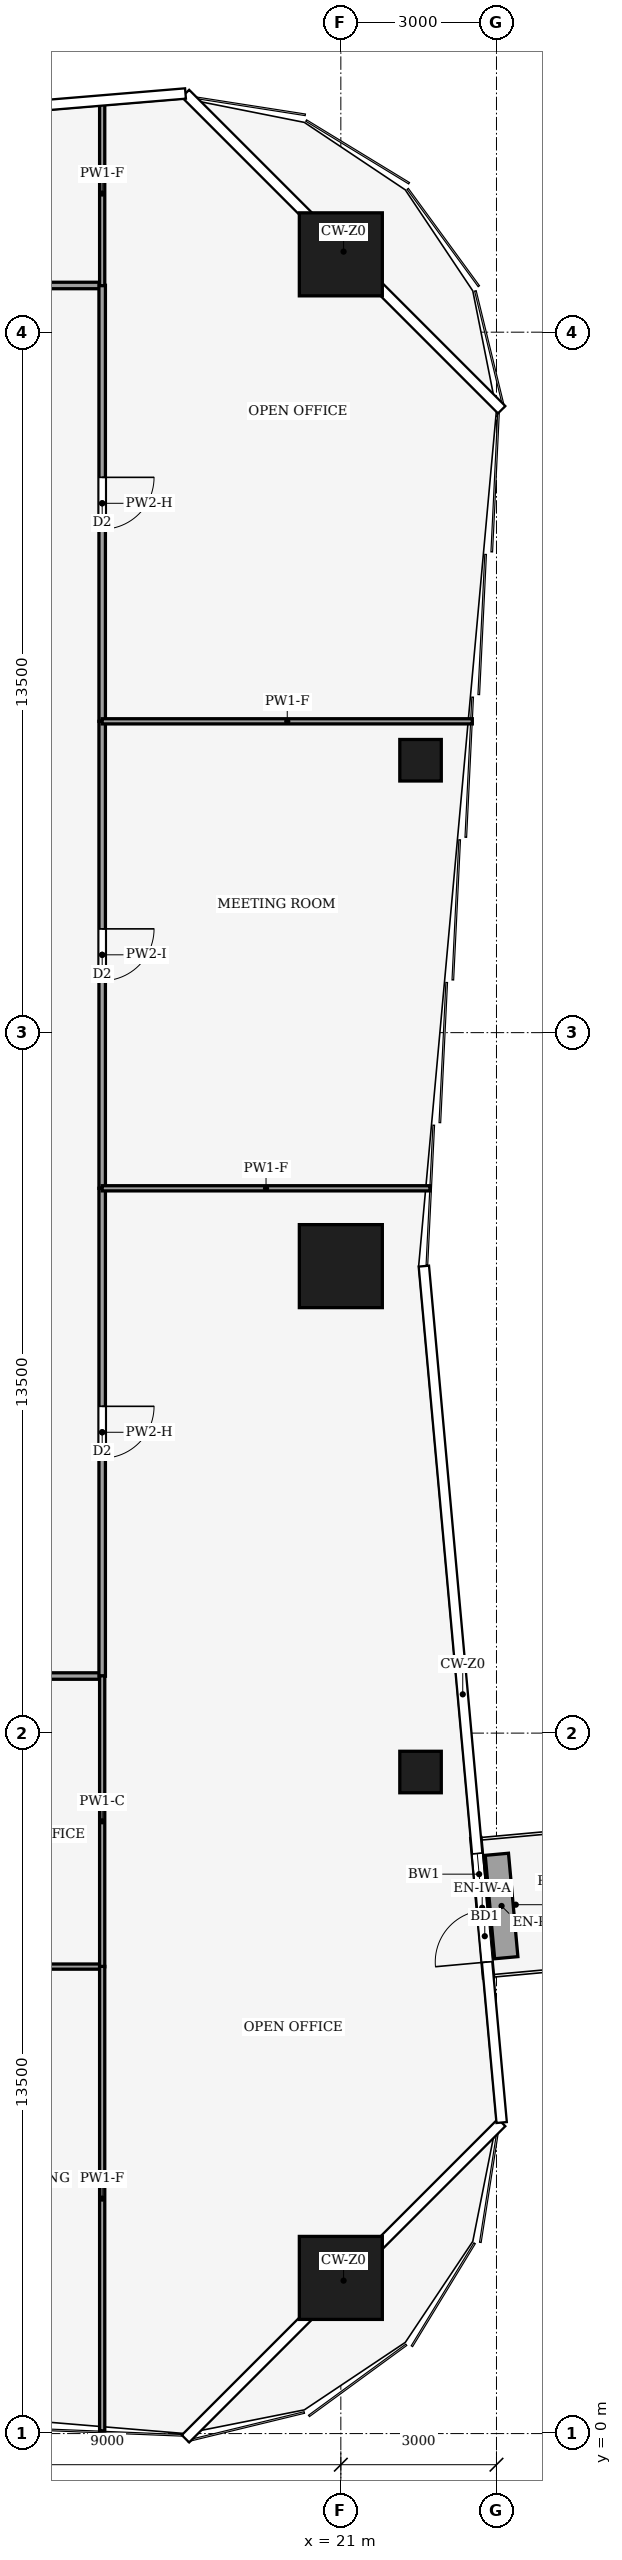
"""IFC4 building model, lengths in metres.
Left out: names, types, materials, properties, quantities, classifications, styles, units other than length and angle.
Written with IfcOpenShell. Run it as: python <this file> out.ifc"""

import sys

from ifc_helpers import new_model, si_unit, direction, frame, frame_2d, origin, origin_2d, place, context, subcontext, project, spatial, rectangle, hollow_rectangle, extrude, element, fill, save


model = new_model("IFC4")
c1 = context("Model", 3, precision=1e-05, world=origin(), true_north=direction((0.0, 1.0)))
c2 = subcontext(c1, "Body", "Model", "MODEL_VIEW")
j1 = project(units=[si_unit("LENGTHUNIT", "METRE"), si_unit("PLANEANGLEUNIT", "RADIAN")], contexts=[c1])
p1 = place(None, origin())
s1 = spatial("IfcSite", under=j1, at=p1, CompositionType="ELEMENT")
p2 = place(p1, origin())
s2 = spatial("IfcBuilding", under=s1, at=p2, CompositionType="ELEMENT")
p3 = place(p2, frame((0.0, 0.0, 42.0)))
s3 = spatial("IfcBuildingStorey", under=s2, at=p3, CompositionType="ELEMENT", Elevation=42.0)
for number, where, z_axis, x_axis in (
    (1, (21.0, 42.0, 0.0), (0.0, 0.0, 1.0), (1.0, 0.0, 0.0)),
    (2, (21.0, 22.5, 0.0), (0.0, 0.0, 1.0), (1.0, 0.0, 0.0)),
    (3, (21.0, 3.0, 0.0), (0.0, 0.0, 1.0), (1.0, 0.0, 0.0)),
):
    element("IfcColumn", number, at=place(p3, frame(where, z_axis=z_axis, x_axis=x_axis)), inside=s3, PredefinedType="COLUMN", context=c2, shape_type="SweptSolid", body=[
        extrude(hollow_rectangle(XDim=1.6, YDim=1.6, WallThickness=0.09, at=origin_2d()), origin(), (0.0, 0.0, 1.0), 4.0),
    ])
for number, where, z_axis, x_axis in (
    (4, (22.536, 12.75, 0.0), (0.0, 0.0, 1.0), (1.0, 0.0, 0.0)),
    (5, (22.536, 32.25, 0.0), (0.0, 0.0, 1.0), (1.0, 0.0, 0.0)),
):
    element("IfcColumn", number, at=place(p3, frame(where, z_axis=z_axis, x_axis=x_axis)), inside=s3, PredefinedType="COLUMN", context=c2, shape_type="SweptSolid", body=[
        extrude(hollow_rectangle(XDim=0.8, YDim=0.8, WallThickness=0.04, at=origin_2d()), origin(), (0.0, 0.0, 1.0), 4.0),
    ])
p4 = place(p3, frame((23.847, 8.789, 0.0), z_axis=(0.0, 0.0, 1.0), x_axis=(-0.090552042494, 0.995891724838, 0.0)))
e6 = element("IfcWall", 6, at=p4, inside=s3, PredefinedType="SOLIDWALL", context=c2, shape_type="SweptSolid", body=[
    extrude(rectangle(XDim=2.701, YDim=0.2, at=frame_2d((1.351, 0.0))), origin(), (0.0, 0.0, 1.0), 3.65),
])
p5 = place(p4, frame((0.3, 0.0, 0.0)))
e7 = element("IfcOpeningElement", 7, at=p5, cuts=e6, PredefinedType="OPENING", context=c2, shape_type="SweptSolid", body=[
    extrude(rectangle(XDim=1.0, YDim=2.1, at=frame_2d((0.5, 1.05))), frame((0.0, 0.11, 0.0), z_axis=(0.0, -1.0, 0.0), x_axis=(1.0, 0.0, 0.0)), (0.0, 0.0, 1.0), 0.22),
])
p6 = place(p4, frame((1.601, 0.0, 0.9)))
e8 = element("IfcOpeningElement", 8, at=p6, cuts=e6, PredefinedType="OPENING", context=c2, shape_type="SweptSolid", body=[
    extrude(rectangle(XDim=0.8, YDim=1.2, at=frame_2d((0.4, 0.6))), frame((0.0, 0.11, 0.0), z_axis=(0.0, -1.0, 0.0), x_axis=(1.0, 0.0, 0.0)), (0.0, 0.0, 1.0), 0.22),
])
p7 = place(p3, frame((24.189, 9.171, 0.0), z_axis=(0.0, 0.0, 1.0), x_axis=(-0.090513748512, 0.995895205998, 0.0)))
e9 = element("IfcWall", 9, at=p7, inside=s3, PredefinedType="USERDEFINED", context=c2, shape_type="SweptSolid", body=[
    extrude(rectangle(XDim=2.001, YDim=0.45, at=frame_2d((1.001, 0.0))), origin(), (0.0, 0.0, 1.0), 0.4),
])
p8 = place(p3, frame((16.4, 14.6, 0.0), z_axis=(0.0, 0.0, 1.0), x_axis=(-1.0, 0.0, 0.0)))
e10 = element("IfcWall", 10, at=p8, inside=s3, PredefinedType="PARTITIONING", context=c2, shape_type="SweptSolid", body=[
    extrude(rectangle(XDim=4.4, YDim=0.125, at=frame_2d((2.2, 0.0))), origin(), (0.0, 0.0, 1.0), 3.29),
])
p9 = place(p8, frame((1.7, 0.0, 0.0)))
e11 = element("IfcOpeningElement", 11, at=p9, cuts=e10, PredefinedType="OPENING", context=c2, shape_type="SweptSolid", body=[
    extrude(rectangle(XDim=1.0, YDim=2.1, at=frame_2d((0.5, 1.05))), frame((0.0, 0.073, 0.0), z_axis=(0.0, -1.0, 0.0), x_axis=(1.0, 0.0, 0.0)), (0.0, 0.0, 1.0), 0.145),
])
p10 = place(p3, frame((6.0, 41.4, 0.0), z_axis=(0.0, 0.0, 1.0), x_axis=(1.0, 0.0, 0.0)))
e12 = element("IfcWall", 12, at=p10, inside=s3, PredefinedType="PARTITIONING", context=c2, shape_type="SweptSolid", body=[
    extrude(rectangle(XDim=10.4, YDim=0.125, at=frame_2d((5.2, 0.0))), origin(), (0.0, 0.0, 1.0), 3.54),
])
p11 = place(p10, frame((1.9, 0.0, 0.0)))
e13 = element("IfcOpeningElement", 13, at=p11, cuts=e12, PredefinedType="OPENING", context=c2, shape_type="SweptSolid", body=[
    extrude(rectangle(XDim=1.0, YDim=2.1, at=frame_2d((0.5, 1.05))), frame((0.0, 0.073, 0.0), z_axis=(0.0, -1.0, 0.0), x_axis=(1.0, 0.0, 0.0)), (0.0, 0.0, 1.0), 0.145),
])
p12 = place(p3, frame((16.4, 24.0, 0.0), z_axis=(0.0, 0.0, 1.0), x_axis=(0.0, -1.0, 0.0)))
e14 = element("IfcWall", 14, at=p12, inside=s3, PredefinedType="PARTITIONING", context=c2, shape_type="SweptSolid", body=[
    extrude(rectangle(XDim=9.404, YDim=0.125, at=frame_2d((4.702, 0.0))), origin(), (0.0, 0.0, 1.0), 3.14),
])
p13 = place(p12, frame((4.202, 0.0, 0.0)))
e15 = element("IfcOpeningElement", 15, at=p13, cuts=e14, PredefinedType="OPENING", context=c2, shape_type="SweptSolid", body=[
    extrude(rectangle(XDim=1.0, YDim=2.1, at=frame_2d((0.5, 1.05))), frame((0.0, 0.073, 0.0), z_axis=(0.0, -1.0, 0.0), x_axis=(1.0, 0.0, 0.0)), (0.0, 0.0, 1.0), 0.145),
])
p14 = place(p3, frame((16.4, 33.0, 0.0), z_axis=(0.0, 0.0, 1.0), x_axis=(0.0, -1.0, 0.0)))
e16 = element("IfcWall", 16, at=p14, inside=s3, PredefinedType="PARTITIONING", context=c2, shape_type="SweptSolid", body=[
    extrude(rectangle(XDim=9.0, YDim=0.125, at=frame_2d((4.5, 0.0))), origin(), (0.0, 0.0, 1.0), 3.48),
])
p15 = place(p14, frame((4.0, 0.0, 0.0)))
e17 = element("IfcOpeningElement", 17, at=p15, cuts=e16, PredefinedType="OPENING", context=c2, shape_type="SweptSolid", body=[
    extrude(rectangle(XDim=1.0, YDim=2.1, at=frame_2d((0.5, 1.05))), frame((0.0, 0.073, 0.0), z_axis=(0.0, -1.0, 0.0), x_axis=(1.0, 0.0, 0.0)), (0.0, 0.0, 1.0), 0.145),
])
p16 = place(p3, frame((16.4, 41.404, 0.0), z_axis=(0.0, 0.0, 1.0), x_axis=(0.0, -1.0, 0.0)))
e18 = element("IfcWall", 18, at=p16, inside=s3, PredefinedType="PARTITIONING", context=c2, shape_type="SweptSolid", body=[
    extrude(rectangle(XDim=8.404, YDim=0.125, at=frame_2d((4.202, 0.0))), origin(), (0.0, 0.0, 1.0), 3.14),
])
p17 = place(p16, frame((3.702, 0.0, 0.0)))
e19 = element("IfcOpeningElement", 19, at=p17, cuts=e18, PredefinedType="OPENING", context=c2, shape_type="SweptSolid", body=[
    extrude(rectangle(XDim=1.0, YDim=2.1, at=frame_2d((0.5, 1.05))), frame((0.0, 0.073, 0.0), z_axis=(0.0, -1.0, 0.0), x_axis=(1.0, 0.0, 0.0)), (0.0, 0.0, 1.0), 0.145),
])
p18 = place(p3, frame((16.4, 9.0, 0.0), z_axis=(0.0, 0.0, 1.0), x_axis=(-1.0, 0.0, 0.0)))
e20 = element("IfcWall", 20, at=p18, inside=s3, PredefinedType="PARTITIONING", context=c2, shape_type="SweptSolid", body=[
    extrude(rectangle(XDim=4.4, YDim=0.1, at=frame_2d((2.2, 0.0))), origin(), (0.0, 0.0, 1.0), 3.29),
])
p19 = place(p18, frame((1.7, 0.0, 0.0)))
e21 = element("IfcOpeningElement", 21, at=p19, cuts=e20, PredefinedType="OPENING", context=c2, shape_type="SweptSolid", body=[
    extrude(rectangle(XDim=1.0, YDim=2.1, at=frame_2d((0.5, 1.05))), frame((0.0, 0.06, 0.0), z_axis=(0.0, -1.0, 0.0), x_axis=(1.0, 0.0, 0.0)), (0.0, 0.0, 1.0), 0.12),
])
p20 = place(p3, frame((16.4, 8.996, 0.0), z_axis=(0.0, 0.0, 1.0), x_axis=(0.0, 1.0, 0.0)))
e22 = element("IfcWall", 22, at=p20, inside=s3, PredefinedType="PARTITIONING", context=c2, shape_type="SweptSolid", body=[
    extrude(rectangle(XDim=5.608, YDim=0.1, at=frame_2d((2.804, 0.0))), origin(), (0.0, 0.0, 1.0), 3.87),
])
p21 = place(p3, frame((16.4, 0.053, 0.0), z_axis=(0.0, 0.0, 1.0), x_axis=(0.0, 1.0, 0.0)))
e23 = element("IfcWall", 23, at=p21, inside=s3, PredefinedType="PARTITIONING", context=c2, shape_type="SweptSolid", body=[
    extrude(rectangle(XDim=8.951, YDim=0.1, at=frame_2d((4.475, 0.0))), origin(), (0.0, 0.0, 1.0), 3.04),
])
p22 = place(p3, frame((16.4, 41.396, 0.0), z_axis=(0.0, 0.0, 1.0), x_axis=(0.0, 1.0, 0.0)))
e24 = element("IfcWall", 24, at=p22, inside=s3, PredefinedType="PARTITIONING", context=c2, shape_type="SweptSolid", body=[
    extrude(rectangle(XDim=3.551, YDim=0.1, at=frame_2d((1.775, 0.0))), origin(), (0.0, 0.0, 1.0), 3.04),
])
p23 = place(p3, frame((22.716, 24.0, 0.0), z_axis=(0.0, 0.0, 1.0), x_axis=(-1.0, 0.0, 0.0)))
e25 = element("IfcWall", 25, at=p23, inside=s3, PredefinedType="PARTITIONING", context=c2, shape_type="SweptSolid", body=[
    extrude(rectangle(XDim=6.316, YDim=0.1, at=frame_2d((3.158, 0.0))), origin(), (0.0, 0.0, 1.0), 3.04),
])
p24 = place(p3, frame((23.534, 33.0, 0.0), z_axis=(0.0, 0.0, 1.0), x_axis=(-1.0, 0.0, 0.0)))
e26 = element("IfcWall", 26, at=p24, inside=s3, PredefinedType="PARTITIONING", context=c2, shape_type="SweptSolid", body=[
    extrude(rectangle(XDim=7.135, YDim=0.1, at=frame_2d((3.567, 0.0))), origin(), (0.0, 0.0, 1.0), 3.04),
])
p25 = place(p5, origin())
e27 = element("IfcDoor", 27, at=p25, inside=s3, OperationType="SINGLE_SWING_LEFT", PredefinedType="DOOR", context=c2, shape_type="SweptSolid", body=[
    extrude(rectangle(XDim=1.0, YDim=2.1, at=frame_2d((0.5, 1.05))), frame((0.0, 0.025, 0.0), z_axis=(0.0, -1.0, 0.0), x_axis=(1.0, 0.0, 0.0)), (0.0, 0.0, 1.0), 0.05),
])
fill(e7, e27)
p26 = place(p6, origin())
e28 = element("IfcWindow", 28, at=p26, inside=s3, PartitioningType="SINGLE_PANEL", PredefinedType="WINDOW", context=c2, shape_type="SweptSolid", body=[
    extrude(rectangle(XDim=0.8, YDim=1.2, at=frame_2d((0.4, 0.6))), frame((0.0, 0.03, 0.0), z_axis=(0.0, -1.0, 0.0), x_axis=(1.0, 0.0, 0.0)), (0.0, 0.0, 1.0), 0.06),
])
fill(e8, e28)
p27 = place(p13, origin())
e29 = element("IfcDoor", 29, at=p27, inside=s3, OperationType="SINGLE_SWING_RIGHT", PredefinedType="DOOR", context=c2, shape_type="SweptSolid", body=[
    extrude(rectangle(XDim=1.0, YDim=2.1, at=frame_2d((0.5, 1.05))), frame((0.0, 0.025, 0.0), z_axis=(0.0, -1.0, 0.0), x_axis=(1.0, 0.0, 0.0)), (0.0, 0.0, 1.0), 0.05),
])
fill(e15, e29)
p28 = place(p15, origin())
e30 = element("IfcDoor", 30, at=p28, inside=s3, OperationType="SINGLE_SWING_LEFT", PredefinedType="DOOR", context=c2, shape_type="SweptSolid", body=[
    extrude(rectangle(XDim=1.0, YDim=2.1, at=frame_2d((0.5, 1.05))), frame((0.0, 0.025, 0.0), z_axis=(0.0, -1.0, 0.0), x_axis=(1.0, 0.0, 0.0)), (0.0, 0.0, 1.0), 0.05),
])
fill(e17, e30)
p29 = place(p17, origin())
e31 = element("IfcDoor", 31, at=p29, inside=s3, OperationType="SINGLE_SWING_RIGHT", PredefinedType="DOOR", context=c2, shape_type="SweptSolid", body=[
    extrude(rectangle(XDim=1.0, YDim=2.1, at=frame_2d((0.5, 1.05))), frame((0.0, 0.025, 0.0), z_axis=(0.0, -1.0, 0.0), x_axis=(1.0, 0.0, 0.0)), (0.0, 0.0, 1.0), 0.05),
])
fill(e19, e31)
save(model, sys.argv[1])
